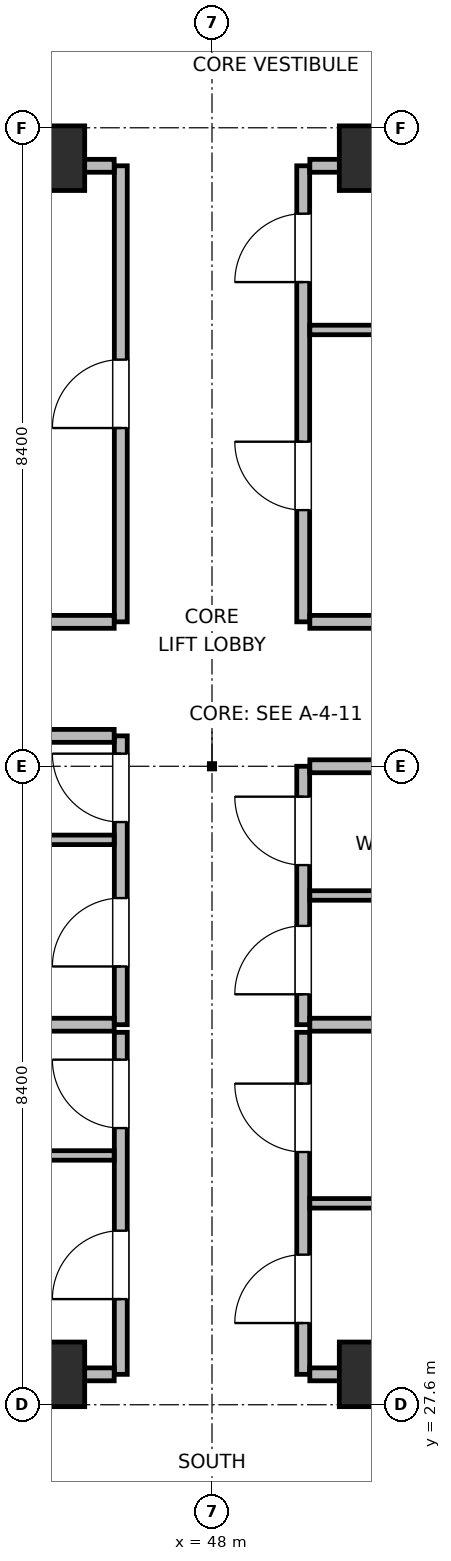
"""IFC4 building model, lengths in metres.
Left out: names, types, materials, properties, quantities, classifications, styles, units other than length and angle.
Written with IfcOpenShell. Run it as: python <this file> out.ifc"""

import sys

from ifc_helpers import new_model, si_unit, direction, frame, frame_2d, origin, origin_2d, place, context, subcontext, project, spatial, rectangle, extrude, element, fill, save


model = new_model("IFC4")
c1 = context("Model", 3, precision=1e-05, world=origin(), true_north=direction((0.0, 1.0)))
c2 = subcontext(c1, "Body", "Model", "MODEL_VIEW")
j1 = project(units=[si_unit("LENGTHUNIT", "METRE"), si_unit("PLANEANGLEUNIT", "RADIAN")], contexts=[c1])
p1 = place(None, origin())
s1 = spatial("IfcSite", under=j1, at=p1, CompositionType="ELEMENT")
p2 = place(p1, origin())
s2 = spatial("IfcBuilding", under=s1, at=p2, CompositionType="ELEMENT")
p3 = place(p2, frame((0.0, 0.0, 286.2)))
s3 = spatial("IfcBuildingStorey", under=s2, at=p3, CompositionType="ELEMENT", Elevation=286.2)
for number, where, z_axis, x_axis in (
    (1, (45.9, 28.0, 0.0), (0.0, 0.0, 1.0), (1.0, 0.0, 0.0)),
    (2, (50.1, 28.0, 0.0), (0.0, 0.0, 1.0), (1.0, 0.0, 0.0)),
    (3, (45.9, 44.0, 0.0), (0.0, 0.0, 1.0), (1.0, 0.0, 0.0)),
    (4, (50.1, 44.0, 0.0), (0.0, 0.0, 1.0), (1.0, 0.0, 0.0)),
):
    element("IfcColumn", number, at=place(p3, frame(where, z_axis=z_axis, x_axis=x_axis)), inside=s3, PredefinedType="COLUMN", context=c2, shape_type="SweptSolid", body=[
        extrude(rectangle(XDim=0.85, YDim=0.85, at=origin_2d()), origin(), (0.0, 0.0, 1.0), 3.9),
    ])
p4 = place(p3, frame((46.8, 32.6, 0.0), z_axis=(0.0, 0.0, 1.0), x_axis=(0.0, 1.0, 0.0)))
e5 = element("IfcWall", 5, at=p4, inside=s3, PredefinedType="PARTITIONING", context=c2, shape_type="SweptSolid", body=[
    extrude(rectangle(XDim=3.8, YDim=0.17, at=frame_2d((1.9, 0.0))), origin(), (0.0, 0.0, 1.0), 3.68),
])
p5 = place(p4, frame((0.766, 0.0, 0.0)))
e6 = element("IfcOpeningElement", 6, at=p5, cuts=e5, PredefinedType="OPENING", context=c2, shape_type="SweptSolid", body=[
    extrude(rectangle(XDim=0.9, YDim=2.02, at=frame_2d((0.45, 1.01))), frame((0.0, 0.095, 0.0), z_axis=(0.0, -1.0, 0.0), x_axis=(1.0, 0.0, 0.0)), (0.0, 0.0, 1.0), 0.19),
])
p6 = place(p4, frame((2.666, 0.0, 0.0)))
e7 = element("IfcOpeningElement", 7, at=p6, cuts=e5, PredefinedType="OPENING", context=c2, shape_type="SweptSolid", body=[
    extrude(rectangle(XDim=0.9, YDim=2.02, at=frame_2d((0.45, 1.01))), frame((0.0, 0.095, 0.0), z_axis=(0.0, -1.0, 0.0), x_axis=(1.0, 0.0, 0.0)), (0.0, 0.0, 1.0), 0.19),
])
for number, where, z_axis, x_axis in (
    (8, (43.8, 32.6, 0.0), (0.0, 0.0, 1.0), (1.0, 0.0, 0.0)),
    (9, (43.8, 36.4, 0.0), (0.0, 0.0, 1.0), (1.0, 0.0, 0.0)),
):
    element("IfcWall", number, at=place(p3, frame(where, z_axis=z_axis, x_axis=x_axis)), inside=s3, PredefinedType="PARTITIONING", context=c2, shape_type="SweptSolid", body=[
        extrude(rectangle(XDim=2.913, YDim=0.17, at=frame_2d((1.457, 0.0))), origin(), (0.0, 0.0, 1.0), 3.68),
    ])
p7 = place(p3, frame((43.8, 35.032, 0.0), z_axis=(0.0, 0.0, 1.0), x_axis=(1.0, 0.0, 0.0)))
e10 = element("IfcWall", 10, at=p7, inside=s3, PredefinedType="PARTITIONING", context=c2, shape_type="SweptSolid", body=[
    extrude(rectangle(XDim=2.913, YDim=0.125, at=frame_2d((1.457, 0.0))), origin(), (0.0, 0.0, 1.0), 3.68),
])
p8 = place(p3, frame((49.2, 32.6, 0.0), z_axis=(0.0, 0.0, 1.0), x_axis=(0.0, 1.0, 0.0)))
e11 = element("IfcWall", 11, at=p8, inside=s3, PredefinedType="PARTITIONING", context=c2, shape_type="SweptSolid", body=[
    extrude(rectangle(XDim=3.4, YDim=0.17, at=frame_2d((1.7, 0.0))), origin(), (0.0, 0.0, 1.0), 3.68),
])
p9 = place(p8, frame((0.4, 0.0, 0.0)))
e12 = element("IfcOpeningElement", 12, at=p9, cuts=e11, PredefinedType="OPENING", context=c2, shape_type="SweptSolid", body=[
    extrude(rectangle(XDim=0.9, YDim=2.02, at=frame_2d((0.45, 1.01))), frame((0.0, 0.095, 0.0), z_axis=(0.0, -1.0, 0.0), x_axis=(1.0, 0.0, 0.0)), (0.0, 0.0, 1.0), 0.19),
])
p10 = place(p8, frame((2.1, 0.0, 0.0)))
e13 = element("IfcOpeningElement", 13, at=p10, cuts=e11, PredefinedType="OPENING", context=c2, shape_type="SweptSolid", body=[
    extrude(rectangle(XDim=0.9, YDim=2.02, at=frame_2d((0.45, 1.01))), frame((0.0, 0.095, 0.0), z_axis=(0.0, -1.0, 0.0), x_axis=(1.0, 0.0, 0.0)), (0.0, 0.0, 1.0), 0.19),
])
for number, where, z_axis, x_axis in (
    (14, (49.287, 32.6, 0.0), (0.0, 0.0, 1.0), (1.0, 0.0, 0.0)),
    (15, (49.287, 36.0, 0.0), (0.0, 0.0, 1.0), (1.0, 0.0, 0.0)),
):
    element("IfcWall", number, at=place(p3, frame(where, z_axis=z_axis, x_axis=x_axis)), inside=s3, PredefinedType="PARTITIONING", context=c2, shape_type="SweptSolid", body=[
        extrude(rectangle(XDim=2.913, YDim=0.17, at=frame_2d((1.457, 0.0))), origin(), (0.0, 0.0, 1.0), 3.68),
    ])
p11 = place(p3, frame((49.287, 34.3, 0.0), z_axis=(0.0, 0.0, 1.0), x_axis=(1.0, 0.0, 0.0)))
e16 = element("IfcWall", 16, at=p11, inside=s3, PredefinedType="PARTITIONING", context=c2, shape_type="SweptSolid", body=[
    extrude(rectangle(XDim=2.913, YDim=0.125, at=frame_2d((1.457, 0.0))), origin(), (0.0, 0.0, 1.0), 3.68),
])
p12 = place(p3, frame((46.8, 28.0, 0.0), z_axis=(0.0, 0.0, 1.0), x_axis=(0.0, 1.0, 0.0)))
e17 = element("IfcWall", 17, at=p12, inside=s3, PredefinedType="PARTITIONING", context=c2, shape_type="SweptSolid", body=[
    extrude(rectangle(XDim=4.5, YDim=0.17, at=frame_2d((2.25, 0.0))), origin(), (0.0, 0.0, 1.0), 3.68),
])
p13 = place(p12, frame((0.99, 0.0, 0.0)))
e18 = element("IfcOpeningElement", 18, at=p13, cuts=e17, PredefinedType="OPENING", context=c2, shape_type="SweptSolid", body=[
    extrude(rectangle(XDim=0.9, YDim=2.02, at=frame_2d((0.45, 1.01))), frame((0.0, 0.095, 0.0), z_axis=(0.0, -1.0, 0.0), x_axis=(1.0, 0.0, 0.0)), (0.0, 0.0, 1.0), 0.19),
])
p14 = place(p12, frame((3.24, 0.0, 0.0)))
e19 = element("IfcOpeningElement", 19, at=p14, cuts=e17, PredefinedType="OPENING", context=c2, shape_type="SweptSolid", body=[
    extrude(rectangle(XDim=0.9, YDim=2.02, at=frame_2d((0.45, 1.01))), frame((0.0, 0.095, 0.0), z_axis=(0.0, -1.0, 0.0), x_axis=(1.0, 0.0, 0.0)), (0.0, 0.0, 1.0), 0.19),
])
p15 = place(p3, frame((42.5, 28.0, 0.0), z_axis=(0.0, 0.0, 1.0), x_axis=(1.0, 0.0, 0.0)))
e20 = element("IfcWall", 20, at=p15, inside=s3, PredefinedType="PARTITIONING", context=c2, shape_type="SweptSolid", body=[
    extrude(rectangle(XDim=4.213, YDim=0.17, at=frame_2d((2.106, 0.0))), origin(), (0.0, 0.0, 1.0), 2.765),
])
p16 = place(p3, frame((42.5, 30.88, 0.0), z_axis=(0.0, 0.0, 1.0), x_axis=(1.0, 0.0, 0.0)))
e21 = element("IfcWall", 21, at=p16, inside=s3, PredefinedType="PARTITIONING", context=c2, shape_type="SweptSolid", body=[
    extrude(rectangle(XDim=4.213, YDim=0.125, at=frame_2d((2.106, 0.0))), origin(), (0.0, 0.0, 1.0), 3.68),
])
p17 = place(p3, frame((49.2, 28.0, 0.0), z_axis=(0.0, 0.0, 1.0), x_axis=(0.0, 1.0, 0.0)))
e22 = element("IfcWall", 22, at=p17, inside=s3, PredefinedType="PARTITIONING", context=c2, shape_type="SweptSolid", body=[
    extrude(rectangle(XDim=4.5, YDim=0.17, at=frame_2d((2.25, 0.0))), origin(), (0.0, 0.0, 1.0), 3.68),
])
p18 = place(p17, frame((0.675, 0.0, 0.0)))
e23 = element("IfcOpeningElement", 23, at=p18, cuts=e22, PredefinedType="OPENING", context=c2, shape_type="SweptSolid", body=[
    extrude(rectangle(XDim=0.9, YDim=2.02, at=frame_2d((0.45, 1.01))), frame((0.0, 0.095, 0.0), z_axis=(0.0, -1.0, 0.0), x_axis=(1.0, 0.0, 0.0)), (0.0, 0.0, 1.0), 0.19),
])
p19 = place(p17, frame((2.925, 0.0, 0.0)))
e24 = element("IfcOpeningElement", 24, at=p19, cuts=e22, PredefinedType="OPENING", context=c2, shape_type="SweptSolid", body=[
    extrude(rectangle(XDim=0.9, YDim=2.02, at=frame_2d((0.45, 1.01))), frame((0.0, 0.095, 0.0), z_axis=(0.0, -1.0, 0.0), x_axis=(1.0, 0.0, 0.0)), (0.0, 0.0, 1.0), 0.19),
])
p20 = place(p3, frame((49.287, 28.0, 0.0), z_axis=(0.0, 0.0, 1.0), x_axis=(1.0, 0.0, 0.0)))
e25 = element("IfcWall", 25, at=p20, inside=s3, PredefinedType="PARTITIONING", context=c2, shape_type="SweptSolid", body=[
    extrude(rectangle(XDim=4.213, YDim=0.17, at=frame_2d((2.106, 0.0))), origin(), (0.0, 0.0, 1.0), 2.765),
])
p21 = place(p3, frame((49.287, 30.25, 0.0), z_axis=(0.0, 0.0, 1.0), x_axis=(1.0, 0.0, 0.0)))
e26 = element("IfcWall", 26, at=p21, inside=s3, PredefinedType="PARTITIONING", context=c2, shape_type="SweptSolid", body=[
    extrude(rectangle(XDim=4.213, YDim=0.125, at=frame_2d((2.106, 0.0))), origin(), (0.0, 0.0, 1.0), 3.68),
])
p22 = place(p3, frame((46.8, 37.9, 0.0), z_axis=(0.0, 0.0, 1.0), x_axis=(0.0, 1.0, 0.0)))
e27 = element("IfcWall", 27, at=p22, inside=s3, PredefinedType="PARTITIONING", context=c2, shape_type="SweptSolid", body=[
    extrude(rectangle(XDim=6.0, YDim=0.17, at=frame_2d((3.0, 0.0))), origin(), (0.0, 0.0, 1.0), 3.68),
])
p23 = place(p22, frame((2.55, 0.0, 0.0)))
e28 = element("IfcOpeningElement", 28, at=p23, cuts=e27, PredefinedType="OPENING", context=c2, shape_type="SweptSolid", body=[
    extrude(rectangle(XDim=0.9, YDim=2.02, at=frame_2d((0.45, 1.01))), frame((0.0, 0.095, 0.0), z_axis=(0.0, -1.0, 0.0), x_axis=(1.0, 0.0, 0.0)), (0.0, 0.0, 1.0), 0.19),
])
p24 = place(p3, frame((42.5, 37.9, 0.0), z_axis=(0.0, 0.0, 1.0), x_axis=(1.0, 0.0, 0.0)))
e29 = element("IfcWall", 29, at=p24, inside=s3, PredefinedType="PARTITIONING", context=c2, shape_type="SweptSolid", body=[
    extrude(rectangle(XDim=4.213, YDim=0.17, at=frame_2d((2.106, 0.0))), origin(), (0.0, 0.0, 1.0), 3.68),
])
p25 = place(p3, frame((42.5, 43.9, 0.0), z_axis=(0.0, 0.0, 1.0), x_axis=(1.0, 0.0, 0.0)))
e30 = element("IfcWall", 30, at=p25, inside=s3, PredefinedType="PARTITIONING", context=c2, shape_type="SweptSolid", body=[
    extrude(rectangle(XDim=4.213, YDim=0.17, at=frame_2d((2.106, 0.0))), origin(), (0.0, 0.0, 1.0), 2.765),
])
p26 = place(p3, frame((49.2, 37.9, 0.0), z_axis=(0.0, 0.0, 1.0), x_axis=(0.0, 1.0, 0.0)))
e31 = element("IfcWall", 31, at=p26, inside=s3, PredefinedType="PARTITIONING", context=c2, shape_type="SweptSolid", body=[
    extrude(rectangle(XDim=6.0, YDim=0.17, at=frame_2d((3.0, 0.0))), origin(), (0.0, 0.0, 1.0), 3.68),
])
p27 = place(p26, frame((1.47, 0.0, 0.0)))
e32 = element("IfcOpeningElement", 32, at=p27, cuts=e31, PredefinedType="OPENING", context=c2, shape_type="SweptSolid", body=[
    extrude(rectangle(XDim=0.9, YDim=2.02, at=frame_2d((0.45, 1.01))), frame((0.0, 0.095, 0.0), z_axis=(0.0, -1.0, 0.0), x_axis=(1.0, 0.0, 0.0)), (0.0, 0.0, 1.0), 0.19),
])
p28 = place(p26, frame((4.47, 0.0, 0.0)))
e33 = element("IfcOpeningElement", 33, at=p28, cuts=e31, PredefinedType="OPENING", context=c2, shape_type="SweptSolid", body=[
    extrude(rectangle(XDim=0.9, YDim=2.02, at=frame_2d((0.45, 1.01))), frame((0.0, 0.095, 0.0), z_axis=(0.0, -1.0, 0.0), x_axis=(1.0, 0.0, 0.0)), (0.0, 0.0, 1.0), 0.19),
])
p29 = place(p3, frame((49.287, 37.9, 0.0), z_axis=(0.0, 0.0, 1.0), x_axis=(1.0, 0.0, 0.0)))
e34 = element("IfcWall", 34, at=p29, inside=s3, PredefinedType="PARTITIONING", context=c2, shape_type="SweptSolid", body=[
    extrude(rectangle(XDim=4.113, YDim=0.17, at=frame_2d((2.056, 0.0))), origin(), (0.0, 0.0, 1.0), 3.68),
])
p30 = place(p3, frame((49.287, 43.9, 0.0), z_axis=(0.0, 0.0, 1.0), x_axis=(1.0, 0.0, 0.0)))
e35 = element("IfcWall", 35, at=p30, inside=s3, PredefinedType="PARTITIONING", context=c2, shape_type="SweptSolid", body=[
    extrude(rectangle(XDim=4.113, YDim=0.17, at=frame_2d((2.056, 0.0))), origin(), (0.0, 0.0, 1.0), 2.765),
])
p31 = place(p3, frame((49.287, 41.74, 0.0), z_axis=(0.0, 0.0, 1.0), x_axis=(1.0, 0.0, 0.0)))
e36 = element("IfcWall", 36, at=p31, inside=s3, PredefinedType="PARTITIONING", context=c2, shape_type="SweptSolid", body=[
    extrude(rectangle(XDim=4.113, YDim=0.125, at=frame_2d((2.056, 0.0))), origin(), (0.0, 0.0, 1.0), 3.68),
])
p32 = place(p5, origin())
e37 = element("IfcDoor", 37, at=p32, inside=s3, OperationType="SINGLE_SWING_LEFT", PredefinedType="DOOR", context=c2, shape_type="SweptSolid", body=[
    extrude(rectangle(XDim=0.9, YDim=2.02, at=frame_2d((0.45, 1.01))), frame((0.0, 0.025, 0.0), z_axis=(0.0, -1.0, 0.0), x_axis=(1.0, 0.0, 0.0)), (0.0, 0.0, 1.0), 0.05),
])
fill(e6, e37)
p33 = place(p6, origin())
e38 = element("IfcDoor", 38, at=p33, inside=s3, OperationType="SINGLE_SWING_RIGHT", PredefinedType="DOOR", context=c2, shape_type="SweptSolid", body=[
    extrude(rectangle(XDim=0.9, YDim=2.02, at=frame_2d((0.45, 1.01))), frame((0.0, 0.025, 0.0), z_axis=(0.0, -1.0, 0.0), x_axis=(1.0, 0.0, 0.0)), (0.0, 0.0, 1.0), 0.05),
])
fill(e7, e38)
p34 = place(p9, origin())
e39 = element("IfcDoor", 39, at=p34, inside=s3, OperationType="SINGLE_SWING_LEFT", PredefinedType="DOOR", context=c2, shape_type="SweptSolid", body=[
    extrude(rectangle(XDim=0.9, YDim=2.02, at=frame_2d((0.45, 1.01))), frame((0.0, 0.025, 0.0), z_axis=(0.0, -1.0, 0.0), x_axis=(1.0, 0.0, 0.0)), (0.0, 0.0, 1.0), 0.05),
])
fill(e12, e39)
p35 = place(p10, origin())
e40 = element("IfcDoor", 40, at=p35, inside=s3, OperationType="SINGLE_SWING_RIGHT", PredefinedType="DOOR", context=c2, shape_type="SweptSolid", body=[
    extrude(rectangle(XDim=0.9, YDim=2.02, at=frame_2d((0.45, 1.01))), frame((0.0, 0.025, 0.0), z_axis=(0.0, -1.0, 0.0), x_axis=(1.0, 0.0, 0.0)), (0.0, 0.0, 1.0), 0.05),
])
fill(e13, e40)
p36 = place(p13, origin())
e41 = element("IfcDoor", 41, at=p36, inside=s3, OperationType="SINGLE_SWING_LEFT", PredefinedType="DOOR", context=c2, shape_type="SweptSolid", body=[
    extrude(rectangle(XDim=0.9, YDim=2.02, at=frame_2d((0.45, 1.01))), frame((0.0, 0.025, 0.0), z_axis=(0.0, -1.0, 0.0), x_axis=(1.0, 0.0, 0.0)), (0.0, 0.0, 1.0), 0.05),
])
fill(e18, e41)
p37 = place(p14, origin())
e42 = element("IfcDoor", 42, at=p37, inside=s3, OperationType="SINGLE_SWING_RIGHT", PredefinedType="DOOR", context=c2, shape_type="SweptSolid", body=[
    extrude(rectangle(XDim=0.9, YDim=2.02, at=frame_2d((0.45, 1.01))), frame((0.0, 0.025, 0.0), z_axis=(0.0, -1.0, 0.0), x_axis=(1.0, 0.0, 0.0)), (0.0, 0.0, 1.0), 0.05),
])
fill(e19, e42)
p38 = place(p18, origin())
e43 = element("IfcDoor", 43, at=p38, inside=s3, OperationType="SINGLE_SWING_LEFT", PredefinedType="DOOR", context=c2, shape_type="SweptSolid", body=[
    extrude(rectangle(XDim=0.9, YDim=2.02, at=frame_2d((0.45, 1.01))), frame((0.0, 0.025, 0.0), z_axis=(0.0, -1.0, 0.0), x_axis=(1.0, 0.0, 0.0)), (0.0, 0.0, 1.0), 0.05),
])
fill(e23, e43)
p39 = place(p19, origin())
e44 = element("IfcDoor", 44, at=p39, inside=s3, OperationType="SINGLE_SWING_RIGHT", PredefinedType="DOOR", context=c2, shape_type="SweptSolid", body=[
    extrude(rectangle(XDim=0.9, YDim=2.02, at=frame_2d((0.45, 1.01))), frame((0.0, 0.025, 0.0), z_axis=(0.0, -1.0, 0.0), x_axis=(1.0, 0.0, 0.0)), (0.0, 0.0, 1.0), 0.05),
])
fill(e24, e44)
p40 = place(p23, origin())
e45 = element("IfcDoor", 45, at=p40, inside=s3, OperationType="SINGLE_SWING_LEFT", PredefinedType="DOOR", context=c2, shape_type="SweptSolid", body=[
    extrude(rectangle(XDim=0.9, YDim=2.02, at=frame_2d((0.45, 1.01))), frame((0.0, 0.025, 0.0), z_axis=(0.0, -1.0, 0.0), x_axis=(1.0, 0.0, 0.0)), (0.0, 0.0, 1.0), 0.05),
])
fill(e28, e45)
p41 = place(p27, origin())
e46 = element("IfcDoor", 46, at=p41, inside=s3, OperationType="SINGLE_SWING_RIGHT", PredefinedType="DOOR", context=c2, shape_type="SweptSolid", body=[
    extrude(rectangle(XDim=0.9, YDim=2.02, at=frame_2d((0.45, 1.01))), frame((0.0, 0.025, 0.0), z_axis=(0.0, -1.0, 0.0), x_axis=(1.0, 0.0, 0.0)), (0.0, 0.0, 1.0), 0.05),
])
fill(e32, e46)
p42 = place(p28, origin())
e47 = element("IfcDoor", 47, at=p42, inside=s3, OperationType="SINGLE_SWING_LEFT", PredefinedType="DOOR", context=c2, shape_type="SweptSolid", body=[
    extrude(rectangle(XDim=0.9, YDim=2.02, at=frame_2d((0.45, 1.01))), frame((0.0, 0.025, 0.0), z_axis=(0.0, -1.0, 0.0), x_axis=(1.0, 0.0, 0.0)), (0.0, 0.0, 1.0), 0.05),
])
fill(e33, e47)
save(model, sys.argv[1])
